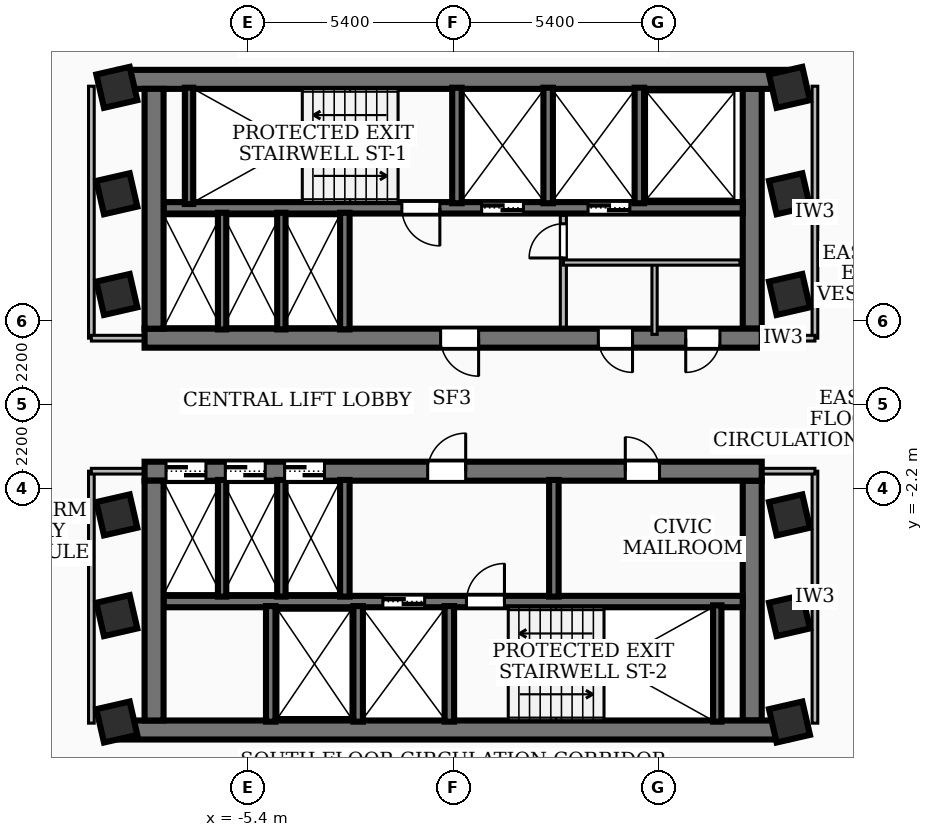
"""IFC4 building model, lengths in metres.
Left out: names, types, materials, properties, quantities, classifications, styles, units other than length and angle.
Written with IfcOpenShell. Run it as: python <this file> out.ifc"""

import sys

from ifc_helpers import new_model, si_unit, direction, frame, frame_2d, origin, origin_2d, place, context, subcontext, project, spatial, rectangle, extrude, element, fill, save


model = new_model("IFC4")
c1 = context("Model", 3, precision=1e-05, world=origin(), true_north=direction((0.0, 1.0)))
c2 = subcontext(c1, "Body", "Model", "MODEL_VIEW")
j1 = project(units=[si_unit("LENGTHUNIT", "METRE"), si_unit("PLANEANGLEUNIT", "RADIAN")], contexts=[c1])
p1 = place(None, origin())
s1 = spatial("IfcSite", under=j1, at=p1, CompositionType="ELEMENT")
p2 = place(p1, origin())
s2 = spatial("IfcBuilding", under=s1, at=p2, CompositionType="ELEMENT")
p3 = place(p2, frame((0.0, 0.0, 116.28)))
s3 = spatial("IfcBuildingStorey", under=s2, at=p3, CompositionType="ELEMENT", Elevation=116.28)
p4 = place(p3, frame((-8.78, 8.56, 0.0), z_axis=(0.0, 0.0, 1.0), x_axis=(1.0, 0.0, 0.0)))
e1 = element("IfcWall", 1, at=p4, inside=s3, PredefinedType="SHEAR", context=c2, shape_type="SweptSolid", body=[
    extrude(rectangle(XDim=17.56, YDim=0.5, at=frame_2d((8.78, 0.0))), origin(), (0.0, 0.0, 1.0), 3.34),
])
p5 = place(p3, frame((8.12, 1.75, 0.0), z_axis=(0.0, 0.0, 1.0), x_axis=(-1.0, 0.0, 0.0)))
e2 = element("IfcWall", 2, at=p5, inside=s3, PredefinedType="SHEAR", context=c2, shape_type="SweptSolid", body=[
    extrude(rectangle(XDim=16.24, YDim=0.5, at=frame_2d((8.12, 0.0))), origin(), (0.0, 0.0, 1.0), 3.34),
])
p6 = place(p5, frame((7.45, 0.0, 0.0)))
e3 = element("IfcOpeningElement", 3, at=p6, cuts=e2, PredefinedType="OPENING", context=c2, shape_type="SweptSolid", body=[
    extrude(rectangle(XDim=1.0, YDim=2.1, at=frame_2d((0.5, 1.05))), frame((0.0, 0.26, 0.0), z_axis=(0.0, -1.0, 0.0), x_axis=(1.0, 0.0, 0.0)), (0.0, 0.0, 1.0), 0.52),
])
p7 = place(p5, frame((3.4, 0.0, 0.0)))
e4 = element("IfcOpeningElement", 4, at=p7, cuts=e2, PredefinedType="OPENING", context=c2, shape_type="SweptSolid", body=[
    extrude(rectangle(XDim=0.9, YDim=2.06, at=frame_2d((0.45, 1.03))), frame((0.0, 0.26, 0.0), z_axis=(0.0, -1.0, 0.0), x_axis=(1.0, 0.0, 0.0)), (0.0, 0.0, 1.0), 0.52),
])
p8 = place(p5, frame((1.1, 0.0, 0.0)))
e5 = element("IfcOpeningElement", 5, at=p8, cuts=e2, PredefinedType="OPENING", context=c2, shape_type="SweptSolid", body=[
    extrude(rectangle(XDim=0.9, YDim=2.06, at=frame_2d((0.45, 1.03))), frame((0.0, 0.26, 0.0), z_axis=(0.0, -1.0, 0.0), x_axis=(1.0, 0.0, 0.0)), (0.0, 0.0, 1.0), 0.52),
])
for number, where, z_axis, x_axis in (
    (6, (-7.87, 2.0, 0.0), (0.0, 0.0, 1.0), (0.0, 1.0, 0.0)),
    (7, (7.87, 8.31, 0.0), (0.0, 0.0, 1.0), (0.0, -1.0, 0.0)),
):
    element("IfcWall", number, at=place(p3, frame(where, z_axis=z_axis, x_axis=x_axis)), inside=s3, PredefinedType="SHEAR", context=c2, shape_type="SweptSolid", body=[
        extrude(rectangle(XDim=6.31, YDim=0.5, at=frame_2d((3.155, 0.0))), origin(), (0.0, 0.0, 1.0), 3.34),
    ])
p9 = place(p3, frame((7.62, 5.18, 0.0), z_axis=(0.0, 0.0, 1.0), x_axis=(-1.0, 0.0, 0.0)))
e8 = element("IfcWall", 8, at=p9, inside=s3, PredefinedType="SOLIDWALL", context=c2, shape_type="SweptSolid", body=[
    extrude(rectangle(XDim=15.24, YDim=0.3, at=frame_2d((7.62, 0.0))), origin(), (0.0, 0.0, 1.0), 3.34),
])
p10 = place(p9, frame((5.77, 0.0, 0.0)))
e9 = element("IfcOpeningElement", 9, at=p10, cuts=e8, PredefinedType="OPENING", context=c2, shape_type="SweptSolid", body=[
    extrude(rectangle(XDim=1.1, YDim=2.15, at=frame_2d((0.55, 1.075))), frame((0.0, 0.16, 0.0), z_axis=(0.0, -1.0, 0.0), x_axis=(1.0, 0.0, 0.0)), (0.0, 0.0, 1.0), 0.32),
])
p11 = place(p9, frame((2.97, 0.0, 0.0)))
e10 = element("IfcOpeningElement", 10, at=p11, cuts=e8, PredefinedType="OPENING", context=c2, shape_type="SweptSolid", body=[
    extrude(rectangle(XDim=1.1, YDim=2.15, at=frame_2d((0.55, 1.075))), frame((0.0, 0.16, 0.0), z_axis=(0.0, -1.0, 0.0), x_axis=(1.0, 0.0, 0.0)), (0.0, 0.0, 1.0), 0.32),
])
p12 = place(p9, frame((7.97, 0.0, 0.0)))
e11 = element("IfcOpeningElement", 11, at=p12, cuts=e8, PredefinedType="OPENING", context=c2, shape_type="SweptSolid", body=[
    extrude(rectangle(XDim=1.0, YDim=2.1, at=frame_2d((0.5, 1.05))), frame((0.0, 0.16, 0.0), z_axis=(0.0, -1.0, 0.0), x_axis=(1.0, 0.0, 0.0)), (0.0, 0.0, 1.0), 0.32),
])
p13 = place(p3, frame((8.78, -8.56, 0.0), z_axis=(0.0, 0.0, 1.0), x_axis=(-1.0, 0.0, 0.0)))
e12 = element("IfcWall", 12, at=p13, inside=s3, PredefinedType="SHEAR", context=c2, shape_type="SweptSolid", body=[
    extrude(rectangle(XDim=17.56, YDim=0.5, at=frame_2d((8.78, 0.0))), origin(), (0.0, 0.0, 1.0), 3.34),
])
p14 = place(p3, frame((-8.12, -1.75, 0.0), z_axis=(0.0, 0.0, 1.0), x_axis=(1.0, 0.0, 0.0)))
e13 = element("IfcWall", 13, at=p14, inside=s3, PredefinedType="SHEAR", context=c2, shape_type="SweptSolid", body=[
    extrude(rectangle(XDim=16.24, YDim=0.5, at=frame_2d((8.12, 0.0))), origin(), (0.0, 0.0, 1.0), 3.34),
])
p15 = place(p14, frame((7.45, 0.0, 0.0)))
e14 = element("IfcOpeningElement", 14, at=p15, cuts=e13, PredefinedType="OPENING", context=c2, shape_type="SweptSolid", body=[
    extrude(rectangle(XDim=1.0, YDim=2.1, at=frame_2d((0.5, 1.05))), frame((0.0, 0.26, 0.0), z_axis=(0.0, -1.0, 0.0), x_axis=(1.0, 0.0, 0.0)), (0.0, 0.0, 1.0), 0.52),
])
p16 = place(p14, frame((12.65, 0.0, 0.0)))
e15 = element("IfcOpeningElement", 15, at=p16, cuts=e13, PredefinedType="OPENING", context=c2, shape_type="SweptSolid", body=[
    extrude(rectangle(XDim=0.9, YDim=2.06, at=frame_2d((0.45, 1.03))), frame((0.0, 0.26, 0.0), z_axis=(0.0, -1.0, 0.0), x_axis=(1.0, 0.0, 0.0)), (0.0, 0.0, 1.0), 0.52),
])
p17 = place(p14, frame((0.565, 0.0, 0.0)))
e16 = element("IfcOpeningElement", 16, at=p17, cuts=e13, PredefinedType="OPENING", context=c2, shape_type="SweptSolid", body=[
    extrude(rectangle(XDim=1.05, YDim=2.15, at=frame_2d((0.525, 1.075))), frame((0.0, 0.26, 0.0), z_axis=(0.0, -1.0, 0.0), x_axis=(1.0, 0.0, 0.0)), (0.0, 0.0, 1.0), 0.52),
])
p18 = place(p14, frame((2.125, 0.0, 0.0)))
e17 = element("IfcOpeningElement", 17, at=p18, cuts=e13, PredefinedType="OPENING", context=c2, shape_type="SweptSolid", body=[
    extrude(rectangle(XDim=1.05, YDim=2.15, at=frame_2d((0.525, 1.075))), frame((0.0, 0.26, 0.0), z_axis=(0.0, -1.0, 0.0), x_axis=(1.0, 0.0, 0.0)), (0.0, 0.0, 1.0), 0.52),
])
p19 = place(p14, frame((3.685, 0.0, 0.0)))
e18 = element("IfcOpeningElement", 18, at=p19, cuts=e13, PredefinedType="OPENING", context=c2, shape_type="SweptSolid", body=[
    extrude(rectangle(XDim=1.05, YDim=2.15, at=frame_2d((0.525, 1.075))), frame((0.0, 0.26, 0.0), z_axis=(0.0, -1.0, 0.0), x_axis=(1.0, 0.0, 0.0)), (0.0, 0.0, 1.0), 0.52),
])
for number, where, z_axis, x_axis in (
    (19, (-7.87, -8.31, 0.0), (0.0, 0.0, 1.0), (0.0, 1.0, 0.0)),
    (20, (7.87, -2.0, 0.0), (0.0, 0.0, 1.0), (0.0, -1.0, 0.0)),
):
    element("IfcWall", number, at=place(p3, frame(where, z_axis=z_axis, x_axis=x_axis)), inside=s3, PredefinedType="SHEAR", context=c2, shape_type="SweptSolid", body=[
        extrude(rectangle(XDim=6.31, YDim=0.5, at=frame_2d((3.155, 0.0))), origin(), (0.0, 0.0, 1.0), 3.34),
    ])
p20 = place(p3, frame((-7.62, -5.18, 0.0), z_axis=(0.0, 0.0, 1.0), x_axis=(1.0, 0.0, 0.0)))
e21 = element("IfcWall", 21, at=p20, inside=s3, PredefinedType="SOLIDWALL", context=c2, shape_type="SweptSolid", body=[
    extrude(rectangle(XDim=15.24, YDim=0.3, at=frame_2d((7.62, 0.0))), origin(), (0.0, 0.0, 1.0), 3.34),
])
p21 = place(p20, frame((5.77, 0.0, 0.0)))
e22 = element("IfcOpeningElement", 22, at=p21, cuts=e21, PredefinedType="OPENING", context=c2, shape_type="SweptSolid", body=[
    extrude(rectangle(XDim=1.1, YDim=2.15, at=frame_2d((0.55, 1.075))), frame((0.0, 0.16, 0.0), z_axis=(0.0, -1.0, 0.0), x_axis=(1.0, 0.0, 0.0)), (0.0, 0.0, 1.0), 0.32),
])
p22 = place(p20, frame((7.97, 0.0, 0.0)))
e23 = element("IfcOpeningElement", 23, at=p22, cuts=e21, PredefinedType="OPENING", context=c2, shape_type="SweptSolid", body=[
    extrude(rectangle(XDim=1.0, YDim=2.1, at=frame_2d((0.5, 1.05))), frame((0.0, 0.16, 0.0), z_axis=(0.0, -1.0, 0.0), x_axis=(1.0, 0.0, 0.0)), (0.0, 0.0, 1.0), 0.32),
])
for number, where, z_axis, x_axis in (
    (24, (-6.95, 5.28, 0.0), (0.0, 0.0, 1.0), (0.0, 1.0, 0.0)),
    (25, (6.95, -8.34, 0.0), (0.0, 0.0, 1.0), (0.0, 1.0, 0.0)),
):
    element("IfcWall", number, at=place(p3, frame(where, z_axis=z_axis, x_axis=x_axis)), inside=s3, PredefinedType="SOLIDWALL", context=c2, shape_type="SweptSolid", body=[
        extrude(rectangle(XDim=3.06, YDim=0.22, at=frame_2d((1.53, 0.0))), origin(), (0.0, 0.0, 1.0), 3.34),
    ])
for number, where, z_axis, x_axis in (
    (26, (0.1, 5.3, 0.0), (0.0, 0.0, 1.0), (0.0, 1.0, 0.0)),
    (27, (2.5, 5.3, 0.0), (0.0, 0.0, 1.0), (0.0, 1.0, 0.0)),
    (28, (4.9, 5.3, 0.0), (0.0, 0.0, 1.0), (0.0, 1.0, 0.0)),
):
    element("IfcWall", number, at=place(p3, frame(where, z_axis=z_axis, x_axis=x_axis)), inside=s3, PredefinedType="SOLIDWALL", context=c2, shape_type="SweptSolid", body=[
        extrude(rectangle(XDim=3.04, YDim=0.25, at=frame_2d((1.52, 0.0))), origin(), (0.0, 0.0, 1.0), 3.34),
    ])
p23 = place(p3, frame((-2.85, 1.98, 0.0), z_axis=(0.0, 0.0, 1.0), x_axis=(0.0, 1.0, 0.0)))
e29 = element("IfcWall", 29, at=p23, inside=s3, PredefinedType="SOLIDWALL", context=c2, shape_type="SweptSolid", body=[
    extrude(rectangle(XDim=3.07, YDim=0.25, at=frame_2d((1.535, 0.0))), origin(), (0.0, 0.0, 1.0), 3.34),
])
for number, where, z_axis, x_axis in (
    (30, (-0.1, -8.34, 0.0), (0.0, 0.0, 1.0), (0.0, 1.0, 0.0)),
    (31, (-2.5, -8.34, 0.0), (0.0, 0.0, 1.0), (0.0, 1.0, 0.0)),
    (32, (-4.8, -8.34, 0.0), (0.0, 0.0, 1.0), (0.0, 1.0, 0.0)),
):
    element("IfcWall", number, at=place(p3, frame(where, z_axis=z_axis, x_axis=x_axis)), inside=s3, PredefinedType="SOLIDWALL", context=c2, shape_type="SweptSolid", body=[
        extrude(rectangle(XDim=3.04, YDim=0.25, at=frame_2d((1.52, 0.0))), origin(), (0.0, 0.0, 1.0), 3.34),
    ])
for number, where, z_axis, x_axis in (
    (33, (-2.85, -5.05, 0.0), (0.0, 0.0, 1.0), (0.0, 1.0, 0.0)),
    (34, (2.65, -5.05, 0.0), (0.0, 0.0, 1.0), (0.0, 1.0, 0.0)),
):
    element("IfcWall", number, at=place(p3, frame(where, z_axis=z_axis, x_axis=x_axis)), inside=s3, PredefinedType="SOLIDWALL", context=c2, shape_type="SweptSolid", body=[
        extrude(rectangle(XDim=3.07, YDim=0.25, at=frame_2d((1.535, 0.0))), origin(), (0.0, 0.0, 1.0), 3.34),
    ])
for number, where, z_axis, x_axis in (
    (35, (-6.08, 1.98, 0.0), (0.0, 0.0, 1.0), (0.0, 1.0, 0.0)),
    (36, (-4.52, 1.98, 0.0), (0.0, 0.0, 1.0), (0.0, 1.0, 0.0)),
    (37, (-6.08, -5.05, 0.0), (0.0, 0.0, 1.0), (0.0, 1.0, 0.0)),
    (38, (-4.52, -5.05, 0.0), (0.0, 0.0, 1.0), (0.0, 1.0, 0.0)),
):
    element("IfcWall", number, at=place(p3, frame(where, z_axis=z_axis, x_axis=x_axis)), inside=s3, PredefinedType="SOLIDWALL", context=c2, shape_type="SweptSolid", body=[
        extrude(rectangle(XDim=3.07, YDim=0.22, at=frame_2d((1.535, 0.0))), origin(), (0.0, 0.0, 1.0), 3.34),
    ])
for number, where, z_axis, x_axis in (
    (39, (-8.85, -5.55, 0.0), (0.0, 0.0, 1.0), (0.975, 0.223, 0.0)),
    (40, (-8.85, -2.9, 0.0), (0.0, 0.0, 1.0), (0.975, 0.223, 0.0)),
    (41, (-8.85, 2.9, 0.0), (0.0, 0.0, 1.0), (0.975, 0.223, 0.0)),
    (42, (-8.85, 5.55, 0.0), (0.0, 0.0, 1.0), (0.975, 0.223, 0.0)),
    (43, (8.85, -5.55, 0.0), (0.0, 0.0, 1.0), (0.975, 0.223, 0.0)),
    (44, (8.85, -2.9, 0.0), (0.0, 0.0, 1.0), (0.975, 0.223, 0.0)),
    (45, (8.85, 2.9, 0.0), (0.0, 0.0, 1.0), (0.975, 0.223, 0.0)),
    (46, (8.85, 5.55, 0.0), (0.0, 0.0, 1.0), (0.975, 0.223, 0.0)),
    (47, (-8.85, 8.35, 0.0), (0.0, 0.0, 1.0), (0.975, 0.223, 0.0)),
    (48, (8.85, -8.35, 0.0), (0.0, 0.0, 1.0), (0.975, 0.223, 0.0)),
    (49, (8.85, 8.35, 0.0), (0.0, 0.0, 1.0), (0.975, 0.223, 0.0)),
    (50, (-8.85, -8.35, 0.0), (0.0, 0.0, 1.0), (0.975, 0.223, 0.0)),
):
    element("IfcColumn", number, at=place(p3, frame(where, z_axis=z_axis, x_axis=x_axis)), inside=s3, PredefinedType="COLUMN", context=c2, shape_type="SweptSolid", body=[
        extrude(rectangle(XDim=0.9, YDim=0.9, at=origin_2d()), origin(), (0.0, 0.0, 1.0), 3.6),
    ])
p24 = place(p3, frame((2.9, 2.04, 0.0), z_axis=(0.0, 0.0, 1.0), x_axis=(0.0, 1.0, 0.0)))
e51 = element("IfcWall", 51, at=p24, inside=s3, PredefinedType="PARTITIONING", context=c2, shape_type="SweptSolid", body=[
    extrude(rectangle(XDim=2.94, YDim=0.16, at=frame_2d((1.47, 0.0))), origin(), (0.0, 0.0, 1.0), 2.57),
])
p25 = place(p24, frame((1.82, 0.0, 0.0)))
e52 = element("IfcOpeningElement", 52, at=p25, cuts=e51, PredefinedType="OPENING", context=c2, shape_type="SweptSolid", body=[
    extrude(rectangle(XDim=0.9, YDim=2.06, at=frame_2d((0.45, 1.03))), frame((0.0, 0.09, 0.0), z_axis=(0.0, -1.0, 0.0), x_axis=(1.0, 0.0, 0.0)), (0.0, 0.0, 1.0), 0.18),
])
p26 = place(p3, frame((2.9, 3.74, 0.0), z_axis=(0.0, 0.0, 1.0), x_axis=(1.0, 0.0, 0.0)))
e53 = element("IfcWall", 53, at=p26, inside=s3, PredefinedType="PARTITIONING", context=c2, shape_type="SweptSolid", body=[
    extrude(rectangle(XDim=4.65, YDim=0.138, at=frame_2d((2.325, 0.0))), origin(), (0.0, 0.0, 1.0), 3.34),
])
p27 = place(p3, frame((5.3, 1.85, 0.0), z_axis=(0.0, 0.0, 1.0), x_axis=(0.0, 1.0, 0.0)))
e54 = element("IfcWall", 54, at=p27, inside=s3, PredefinedType="PARTITIONING", context=c2, shape_type="SweptSolid", body=[
    extrude(rectangle(XDim=1.89, YDim=0.138, at=frame_2d((0.945, 0.0))), origin(), (0.0, 0.0, 1.0), 2.57),
])
p28 = place(p3, frame((-9.52, 1.75, 0.0), z_axis=(0.0, 0.0, 1.0), x_axis=(0.0, 1.0, 0.0)))
e55 = element("IfcWall", 55, at=p28, inside=s3, PredefinedType="PARTITIONING", context=c2, shape_type="SweptSolid", body=[
    extrude(rectangle(XDim=6.63, YDim=0.15, at=frame_2d((3.315, 0.0))), origin(), (0.0, 0.0, 1.0), 2.57),
])
p29 = place(p3, frame((-7.85, 1.75, 0.0), z_axis=(0.0, 0.0, 1.0), x_axis=(-1.0, 0.0, 0.0)))
e56 = element("IfcWall", 56, at=p29, inside=s3, PredefinedType="PARTITIONING", context=c2, shape_type="SweptSolid", body=[
    extrude(rectangle(XDim=1.67, YDim=0.15, at=frame_2d((0.835, 0.0))), origin(), (0.0, 0.0, 1.0), 2.57),
])
p30 = place(p3, frame((-9.52, -8.38, 0.0), z_axis=(0.0, 0.0, 1.0), x_axis=(0.0, 1.0, 0.0)))
e57 = element("IfcWall", 57, at=p30, inside=s3, PredefinedType="PARTITIONING", context=c2, shape_type="SweptSolid", body=[
    extrude(rectangle(XDim=6.63, YDim=0.15, at=frame_2d((3.315, 0.0))), origin(), (0.0, 0.0, 1.0), 2.57),
])
p31 = place(p3, frame((-7.85, -1.75, 0.0), z_axis=(0.0, 0.0, 1.0), x_axis=(-1.0, 0.0, 0.0)))
e58 = element("IfcWall", 58, at=p31, inside=s3, PredefinedType="PARTITIONING", context=c2, shape_type="SweptSolid", body=[
    extrude(rectangle(XDim=1.67, YDim=0.15, at=frame_2d((0.835, 0.0))), origin(), (0.0, 0.0, 1.0), 2.57),
])
p32 = place(p3, frame((9.52, 1.75, 0.0), z_axis=(0.0, 0.0, 1.0), x_axis=(0.0, 1.0, 0.0)))
e59 = element("IfcWall", 59, at=p32, inside=s3, PredefinedType="PARTITIONING", context=c2, shape_type="SweptSolid", body=[
    extrude(rectangle(XDim=6.63, YDim=0.15, at=frame_2d((3.315, 0.0))), origin(), (0.0, 0.0, 1.0), 2.57),
])
p33 = place(p3, frame((7.85, 1.75, 0.0), z_axis=(0.0, 0.0, 1.0), x_axis=(1.0, 0.0, 0.0)))
e60 = element("IfcWall", 60, at=p33, inside=s3, PredefinedType="PARTITIONING", context=c2, shape_type="SweptSolid", body=[
    extrude(rectangle(XDim=1.67, YDim=0.15, at=frame_2d((0.835, 0.0))), origin(), (0.0, 0.0, 1.0), 2.57),
])
p34 = place(p3, frame((9.52, -8.38, 0.0), z_axis=(0.0, 0.0, 1.0), x_axis=(0.0, 1.0, 0.0)))
e61 = element("IfcWall", 61, at=p34, inside=s3, PredefinedType="PARTITIONING", context=c2, shape_type="SweptSolid", body=[
    extrude(rectangle(XDim=6.63, YDim=0.15, at=frame_2d((3.315, 0.0))), origin(), (0.0, 0.0, 1.0), 2.57),
])
p35 = place(p3, frame((7.85, -1.75, 0.0), z_axis=(0.0, 0.0, 1.0), x_axis=(1.0, 0.0, 0.0)))
e62 = element("IfcWall", 62, at=p35, inside=s3, PredefinedType="PARTITIONING", context=c2, shape_type="SweptSolid", body=[
    extrude(rectangle(XDim=1.67, YDim=0.15, at=frame_2d((0.835, 0.0))), origin(), (0.0, 0.0, 1.0), 2.57),
])
p36 = place(p6, origin())
e63 = element("IfcDoor", 63, at=p36, inside=s3, OperationType="SINGLE_SWING_LEFT", PredefinedType="DOOR", context=c2, shape_type="SweptSolid", body=[
    extrude(rectangle(XDim=1.0, YDim=2.1, at=frame_2d((0.5, 1.05))), frame((0.0, 0.025, 0.0), z_axis=(0.0, -1.0, 0.0), x_axis=(1.0, 0.0, 0.0)), (0.0, 0.0, 1.0), 0.05),
])
fill(e3, e63)
p37 = place(p15, origin())
e64 = element("IfcDoor", 64, at=p37, inside=s3, OperationType="SINGLE_SWING_RIGHT", PredefinedType="DOOR", context=c2, shape_type="SweptSolid", body=[
    extrude(rectangle(XDim=1.0, YDim=2.1, at=frame_2d((0.5, 1.05))), frame((0.0, 0.025, 0.0), z_axis=(0.0, -1.0, 0.0), x_axis=(1.0, 0.0, 0.0)), (0.0, 0.0, 1.0), 0.05),
])
fill(e14, e64)
p38 = place(p10, origin())
e65 = element("IfcDoor", 65, at=p38, inside=s3, OperationType="DOUBLE_DOOR_SLIDING", PredefinedType="DOOR", context=c2, shape_type="SweptSolid", body=[
    extrude(rectangle(XDim=1.1, YDim=2.15, at=frame_2d((0.55, 1.075))), frame((0.0, 0.025, 0.0), z_axis=(0.0, -1.0, 0.0), x_axis=(1.0, 0.0, 0.0)), (0.0, 0.0, 1.0), 0.05),
])
fill(e9, e65)
p39 = place(p11, origin())
e66 = element("IfcDoor", 66, at=p39, inside=s3, OperationType="DOUBLE_DOOR_SLIDING", PredefinedType="DOOR", context=c2, shape_type="SweptSolid", body=[
    extrude(rectangle(XDim=1.1, YDim=2.15, at=frame_2d((0.55, 1.075))), frame((0.0, 0.025, 0.0), z_axis=(0.0, -1.0, 0.0), x_axis=(1.0, 0.0, 0.0)), (0.0, 0.0, 1.0), 0.05),
])
fill(e10, e66)
p40 = place(p12, origin())
e67 = element("IfcDoor", 67, at=p40, inside=s3, OperationType="SINGLE_SWING_LEFT", PredefinedType="DOOR", context=c2, shape_type="SweptSolid", body=[
    extrude(rectangle(XDim=1.0, YDim=2.1, at=frame_2d((0.5, 1.05))), frame((0.0, 0.025, 0.0), z_axis=(0.0, -1.0, 0.0), x_axis=(1.0, 0.0, 0.0)), (0.0, 0.0, 1.0), 0.05),
])
fill(e11, e67)
p41 = place(p21, origin())
e68 = element("IfcDoor", 68, at=p41, inside=s3, OperationType="DOUBLE_DOOR_SLIDING", PredefinedType="DOOR", context=c2, shape_type="SweptSolid", body=[
    extrude(rectangle(XDim=1.1, YDim=2.15, at=frame_2d((0.55, 1.075))), frame((0.0, 0.025, 0.0), z_axis=(0.0, -1.0, 0.0), x_axis=(1.0, 0.0, 0.0)), (0.0, 0.0, 1.0), 0.05),
])
fill(e22, e68)
p42 = place(p22, origin())
e69 = element("IfcDoor", 69, at=p42, inside=s3, OperationType="SINGLE_SWING_RIGHT", PredefinedType="DOOR", context=c2, shape_type="SweptSolid", body=[
    extrude(rectangle(XDim=1.0, YDim=2.1, at=frame_2d((0.5, 1.05))), frame((0.0, 0.025, 0.0), z_axis=(0.0, -1.0, 0.0), x_axis=(1.0, 0.0, 0.0)), (0.0, 0.0, 1.0), 0.05),
])
fill(e23, e69)
p43 = place(p16, origin())
e70 = element("IfcDoor", 70, at=p43, inside=s3, OperationType="SINGLE_SWING_LEFT", PredefinedType="DOOR", context=c2, shape_type="SweptSolid", body=[
    extrude(rectangle(XDim=0.9, YDim=2.06, at=frame_2d((0.45, 1.03))), frame((0.0, 0.025, 0.0), z_axis=(0.0, -1.0, 0.0), x_axis=(1.0, 0.0, 0.0)), (0.0, 0.0, 1.0), 0.05),
])
fill(e15, e70)
p44 = place(p17, origin())
e71 = element("IfcDoor", 71, at=p44, inside=s3, OperationType="DOUBLE_DOOR_SLIDING", PredefinedType="DOOR", context=c2, shape_type="SweptSolid", body=[
    extrude(rectangle(XDim=1.05, YDim=2.15, at=frame_2d((0.525, 1.075))), frame((0.0, 0.025, 0.0), z_axis=(0.0, -1.0, 0.0), x_axis=(1.0, 0.0, 0.0)), (0.0, 0.0, 1.0), 0.05),
])
fill(e16, e71)
p45 = place(p18, origin())
e72 = element("IfcDoor", 72, at=p45, inside=s3, OperationType="DOUBLE_DOOR_SLIDING", PredefinedType="DOOR", context=c2, shape_type="SweptSolid", body=[
    extrude(rectangle(XDim=1.05, YDim=2.15, at=frame_2d((0.525, 1.075))), frame((0.0, 0.025, 0.0), z_axis=(0.0, -1.0, 0.0), x_axis=(1.0, 0.0, 0.0)), (0.0, 0.0, 1.0), 0.05),
])
fill(e17, e72)
p46 = place(p19, origin())
e73 = element("IfcDoor", 73, at=p46, inside=s3, OperationType="DOUBLE_DOOR_SLIDING", PredefinedType="DOOR", context=c2, shape_type="SweptSolid", body=[
    extrude(rectangle(XDim=1.05, YDim=2.15, at=frame_2d((0.525, 1.075))), frame((0.0, 0.025, 0.0), z_axis=(0.0, -1.0, 0.0), x_axis=(1.0, 0.0, 0.0)), (0.0, 0.0, 1.0), 0.05),
])
fill(e18, e73)
p47 = place(p7, origin())
e74 = element("IfcDoor", 74, at=p47, inside=s3, OperationType="SINGLE_SWING_LEFT", PredefinedType="DOOR", context=c2, shape_type="SweptSolid", body=[
    extrude(rectangle(XDim=0.9, YDim=2.06, at=frame_2d((0.45, 1.03))), frame((0.0, 0.025, 0.0), z_axis=(0.0, -1.0, 0.0), x_axis=(1.0, 0.0, 0.0)), (0.0, 0.0, 1.0), 0.05),
])
fill(e4, e74)
p48 = place(p8, origin())
e75 = element("IfcDoor", 75, at=p48, inside=s3, OperationType="SINGLE_SWING_RIGHT", PredefinedType="DOOR", context=c2, shape_type="SweptSolid", body=[
    extrude(rectangle(XDim=0.9, YDim=2.06, at=frame_2d((0.45, 1.03))), frame((0.0, 0.025, 0.0), z_axis=(0.0, -1.0, 0.0), x_axis=(1.0, 0.0, 0.0)), (0.0, 0.0, 1.0), 0.05),
])
fill(e5, e75)
p49 = place(p25, origin())
e76 = element("IfcDoor", 76, at=p49, inside=s3, OperationType="SINGLE_SWING_LEFT", PredefinedType="DOOR", context=c2, shape_type="SweptSolid", body=[
    extrude(rectangle(XDim=0.9, YDim=2.06, at=frame_2d((0.45, 1.03))), frame((0.0, 0.025, 0.0), z_axis=(0.0, -1.0, 0.0), x_axis=(1.0, 0.0, 0.0)), (0.0, 0.0, 1.0), 0.05),
])
fill(e52, e76)
save(model, sys.argv[1])
